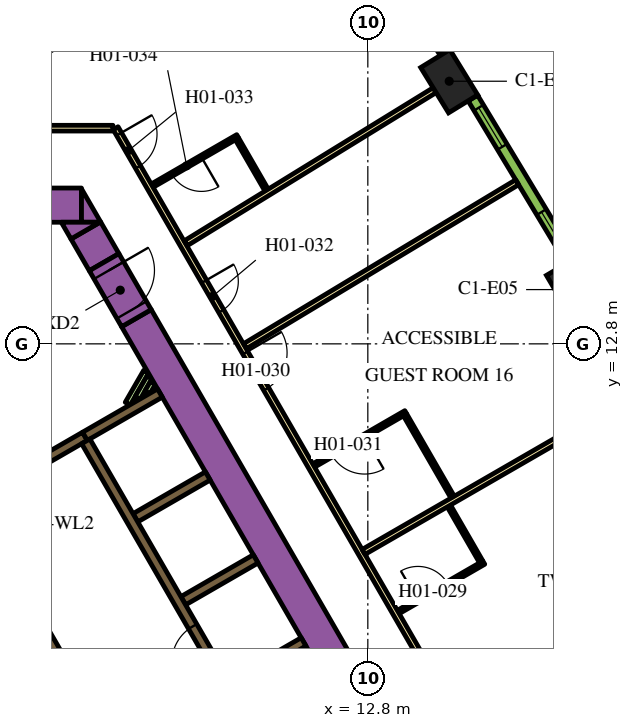
"""IFC4 building model, lengths in metres.
Left out: names, types, materials, properties, quantities, classifications, styles, units other than length and angle.
Written with IfcOpenShell. Run it as: python <this file> out.ifc"""

import sys

from ifc_helpers import new_model, si_unit, direction, frame, frame_2d, origin, origin_2d, place, context, subcontext, project, spatial, polyline, rectangle, outline, extrude, element, fill, save


model = new_model("IFC4")
c1 = context("Model", 3, precision=1e-05, world=origin(), true_north=direction((0.0, 1.0)))
c2 = subcontext(c1, "Body", "Model", "MODEL_VIEW")
j1 = project(units=[si_unit("LENGTHUNIT", "METRE"), si_unit("PLANEANGLEUNIT", "RADIAN")], contexts=[c1])
p1 = place(None, origin())
s1 = spatial("IfcSite", under=j1, at=p1, CompositionType="ELEMENT")
p2 = place(p1, origin())
s2 = spatial("IfcBuilding", under=s1, at=p2, CompositionType="ELEMENT")
p3 = place(p2, frame((0.0, 0.0, 35.4)))
s3 = spatial("IfcBuildingStorey", under=s2, at=p3, CompositionType="ELEMENT", Elevation=35.4)
for number, where, z_axis, x_axis in (
    (1, (18.243, 14.228, 0.0), (0.0, 0.0, 1.0), (-0.508, 0.861, 0.0)),
    (2, (14.942, 19.71, 0.0), (0.0, 0.0, 1.0), (-0.524, 0.852, 0.0)),
):
    element("IfcColumn", number, at=place(p3, frame(where, z_axis=z_axis, x_axis=x_axis)), inside=s3, PredefinedType="COLUMN", context=c2, shape_type="SweptSolid", body=[
        extrude(rectangle(XDim=1.4, YDim=0.9, at=origin_2d()), origin(), (0.0, 0.0, 1.0), 3.9),
    ])
p4 = place(p3, frame((6.711, 13.476, 0.0), z_axis=(0.0, 0.0, 1.0), x_axis=(0.500002723396, -0.866023831425, 0.0)))
e3 = element("IfcWall", 3, at=p4, inside=s3, PredefinedType="SOLIDWALL", context=c2, shape_type="SweptSolid", body=[
    extrude(rectangle(XDim=20.334, YDim=0.9, at=frame_2d((10.167, 0.0))), origin(), (0.0, 0.0, 1.0), 3.9),
])
p5 = place(p3, frame((-4.224, 16.45, 0.0), z_axis=(0.0, 0.0, 1.0), x_axis=(1.0, 0.0, 0.0)))
e4 = element("IfcWall", 4, at=p5, inside=s3, PredefinedType="SOLIDWALL", context=c2, shape_type="SweptSolid", body=[
    extrude(rectangle(XDim=9.488, YDim=0.9, at=frame_2d((4.744, 0.0))), origin(), (0.0, 0.0, 1.0), 3.9),
])
p6 = place(p3, origin())
e5 = element("IfcWall", 5, at=p6, inside=s3, PredefinedType="SOLIDWALL", context=c2, shape_type="SweptSolid", body=[
    extrude(outline(polyline([(5.265, 16.0), (5.265, 16.88), (5.773, 16.0), (5.265, 16.0)])), origin(), (0.0, 0.0, 1.0), 3.9),
])
p7 = place(p3, frame((5.861, 14.949, 0.0), z_axis=(0.0, 0.0, 1.0), x_axis=(-0.50011719232, 0.865957732194, 0.0)))
e6 = element("IfcWall", 6, at=p7, inside=s3, PredefinedType="SOLIDWALL", context=c2, shape_type="SweptSolid", body=[
    extrude(rectangle(XDim=0.964, YDim=0.9, at=frame_2d((0.482, 0.0))), origin(), (0.0, 0.0, 1.0), 3.9),
])
e7 = element("IfcWall", 7, at=p6, inside=s3, PredefinedType="SOLIDWALL", context=c2, shape_type="SweptSolid", body=[
    extrude(outline(polyline([(4.734, 16.0), (5.75, 16.0), (4.988, 15.56), (4.734, 16.0)])), origin(), (0.0, 0.0, 1.0), 3.9),
])
e8 = element("IfcWall", 8, at=p6, inside=s3, PredefinedType="SOLIDWALL", context=c2, shape_type="SweptSolid", body=[
    extrude(outline(polyline([(0.566, 6.725), (0.566, 6.875), (0.566, 6.875), (0.565, 6.875), (0.361, 6.875), (0.035, 7.439), (0.252, 7.564), (0.377, 7.348), (6.552, -3.348), (6.677, -3.564), (6.46, -3.689), (0.448, 6.725), (0.565, 6.725), (0.566, 6.725), (0.566, 6.725)])), origin(), (0.0, 0.0, 1.0), 3.9),
])
p8 = place(p3, frame((4.358, 9.791, 0.0), z_axis=(0.0, 0.0, 1.0), x_axis=(0.866079547155, 0.499906209203, 0.0)))
e9 = element("IfcWall", 9, at=p8, inside=s3, PredefinedType="SOLIDWALL", context=c2, shape_type="SweptSolid", body=[
    extrude(rectangle(XDim=1.15, YDim=0.25, at=frame_2d((0.575, 0.0))), origin(), (0.0, 0.0, 1.0), 3.9),
])
p9 = place(p3, frame((5.356, 10.367, 0.0), z_axis=(0.0, 0.0, 1.0), x_axis=(0.865978535641, 0.50008116922, 0.0)))
e10 = element("IfcWall", 10, at=p9, inside=s3, PredefinedType="SOLIDWALL", context=c2, shape_type="SweptSolid", body=[
    extrude(rectangle(XDim=2.278, YDim=0.25, at=frame_2d((1.139, 0.0))), origin(), (0.0, 0.0, 1.0), 3.9),
])
for number, where, z_axis, x_axis in (
    (11, (6.684, 8.224, 0.0), (0.0, 0.0, 1.0), (0.866, 0.5, 0.0)),
    (12, (7.944, 6.041, 0.0), (0.0, 0.0, 1.0), (0.866, 0.5, 0.0)),
    (13, (9.204, 3.859, 0.0), (0.0, 0.0, 1.0), (0.866, 0.5, 0.0)),
):
    element("IfcWall", number, at=place(p3, frame(where, z_axis=z_axis, x_axis=x_axis)), inside=s3, PredefinedType="SOLIDWALL", context=c2, shape_type="SweptSolid", body=[
        extrude(rectangle(XDim=2.2, YDim=0.25, at=frame_2d((1.1, 0.0))), origin(), (0.0, 0.0, 1.0), 3.9),
    ])
p10 = place(p3, frame((6.482, 11.225, 0.0), z_axis=(0.0, 0.0, 1.0), x_axis=(0.5001061818, 0.865964091014, 0.0)))
e14 = element("IfcWall", 14, at=p10, inside=s3, PredefinedType="PARTITIONING", context=c2, shape_type="SweptSolid", body=[
    extrude(rectangle(XDim=0.973, YDim=0.15, at=frame_2d((0.486, 0.0))), origin(), (0.0, 0.0, 1.0), 2.75),
])
p11 = place(p3, frame((6.742, 11.375, 0.0), z_axis=(0.0, 0.0, 1.0), x_axis=(0.499744951064, 0.86617260629, 0.0)))
e15 = element("IfcWall", 15, at=p11, inside=s3, PredefinedType="PARTITIONING", context=c2, shape_type="SweptSolid", body=[
    extrude(rectangle(XDim=0.626, YDim=0.15, at=frame_2d((0.313, 0.0))), origin(), (0.0, 0.0, 1.0), 2.75),
])
p12 = place(p3, frame((7.001, 11.525, 0.0), z_axis=(0.0, 0.0, 1.0), x_axis=(0.499797962495, 0.866142018774, 0.0)))
e16 = element("IfcWall", 16, at=p12, inside=s3, PredefinedType="PARTITIONING", context=c2, shape_type="SweptSolid", body=[
    extrude(rectangle(XDim=0.28, YDim=0.15, at=frame_2d((0.14, 0.0))), origin(), (0.0, 0.0, 1.0), 2.75),
])
p13 = place(p3, frame((11.553, -0.46, 0.0), z_axis=(0.0, 0.0, 1.0), x_axis=(-0.500006514828, 0.866021642414, 0.0)))
e17 = element("IfcWall", 17, at=p13, inside=s3, PredefinedType="SOLIDWALL", context=c2, shape_type="SweptSolid", body=[
    extrude(rectangle(XDim=12.35, YDim=0.25, at=frame_2d((6.175, 0.0))), origin(), (0.0, 0.0, 1.0), 3.9),
])
p14 = place(p13, frame((0.585, 0.0, 0.0)))
e18 = element("IfcOpeningElement", 18, at=p14, cuts=e17, PredefinedType="OPENING", context=c2, shape_type="SweptSolid", body=[
    extrude(rectangle(XDim=1.1, YDim=2.1, at=frame_2d((0.55, 1.05))), frame((0.0, 0.135, 0.0), z_axis=(0.0, -1.0, 0.0), x_axis=(1.0, 0.0, 0.0)), (0.0, 0.0, 1.0), 0.27),
])
p15 = place(p13, frame((3.105, 0.0, 0.0)))
e19 = element("IfcOpeningElement", 19, at=p15, cuts=e17, PredefinedType="OPENING", context=c2, shape_type="SweptSolid", body=[
    extrude(rectangle(XDim=1.1, YDim=2.1, at=frame_2d((0.55, 1.05))), frame((0.0, 0.135, 0.0), z_axis=(0.0, -1.0, 0.0), x_axis=(1.0, 0.0, 0.0)), (0.0, 0.0, 1.0), 0.27),
])
p16 = place(p13, frame((5.625, 0.0, 0.0)))
e20 = element("IfcOpeningElement", 20, at=p16, cuts=e17, PredefinedType="OPENING", context=c2, shape_type="SweptSolid", body=[
    extrude(rectangle(XDim=1.1, YDim=2.1, at=frame_2d((0.55, 1.05))), frame((0.0, 0.135, 0.0), z_axis=(0.0, -1.0, 0.0), x_axis=(1.0, 0.0, 0.0)), (0.0, 0.0, 1.0), 0.27),
])
p17 = place(p3, frame((8.565, -2.185, 0.0), z_axis=(0.0, 0.0, 1.0), x_axis=(-0.499997954832, 0.866026584559, 0.0)))
e21 = element("IfcWall", 21, at=p17, inside=s3, PredefinedType="SOLIDWALL", context=c2, shape_type="SweptSolid", body=[
    extrude(rectangle(XDim=12.35, YDim=0.25, at=frame_2d((6.175, 0.0))), origin(), (0.0, 0.0, 1.0), 3.9),
])
p18 = place(p17, frame((5.725, 0.0, 0.0)))
e22 = element("IfcOpeningElement", 22, at=p18, cuts=e21, PredefinedType="OPENING", context=c2, shape_type="SweptSolid", body=[
    extrude(rectangle(XDim=0.9, YDim=2.1, at=frame_2d((0.45, 1.05))), frame((0.0, 0.135, 0.0), z_axis=(0.0, -1.0, 0.0), x_axis=(1.0, 0.0, 0.0)), (0.0, 0.0, 1.0), 0.27),
])
p19 = place(p3, frame((5.861, 14.948, 0.0), z_axis=(0.0, 0.0, 1.0), x_axis=(0.500062241894, -0.865989465428, 0.0)))
e23 = element("IfcWall", 23, at=p19, inside=s3, PredefinedType="SOLIDWALL", context=c2, shape_type="SweptSolid", body=[
    extrude(rectangle(XDim=1.7, YDim=0.9, at=frame_2d((0.85, 0.0))), origin(), (0.0, 0.0, 1.0), 3.9),
])
p20 = place(p19, frame((0.25, 0.0, 0.0)))
e24 = element("IfcOpeningElement", 24, at=p20, cuts=e23, PredefinedType="OPENING", context=c2, shape_type="SweptSolid", body=[
    extrude(rectangle(XDim=1.2, YDim=2.1, at=frame_2d((0.6, 1.05))), frame((0.0, 0.46, 0.0), z_axis=(0.0, -1.0, 0.0), x_axis=(1.0, 0.0, 0.0)), (0.0, 0.0, 1.0), 0.92),
])
p21 = place(p3, frame((6.163, 18.475, 0.0), z_axis=(0.0, 0.0, 1.0), x_axis=(0.500001317485, -0.866024643133, 0.0)))
e25 = element("IfcWall", 25, at=p21, inside=s3, PredefinedType="PARTITIONING", context=c2, shape_type="SweptSolid", body=[
    extrude(rectangle(XDim=25.767, YDim=0.15, at=frame_2d((12.883, 0.0))), origin(), (0.0, 0.0, 1.0), 2.75),
])
p22 = place(p21, frame((24.586, 0.0, 0.0)))
e26 = element("IfcOpeningElement", 26, at=p22, cuts=e25, PredefinedType="OPENING", context=c2, shape_type="SweptSolid", body=[
    extrude(rectangle(XDim=1.0, YDim=2.1, at=frame_2d((0.5, 1.05))), frame((0.0, 0.085, 0.0), z_axis=(0.0, -1.0, 0.0), x_axis=(1.0, 0.0, 0.0)), (0.0, 0.0, 1.0), 0.17),
])
p23 = place(p21, frame((19.319, 0.0, 0.0)))
e27 = element("IfcOpeningElement", 27, at=p23, cuts=e25, PredefinedType="OPENING", context=c2, shape_type="SweptSolid", body=[
    extrude(rectangle(XDim=1.0, YDim=2.1, at=frame_2d((0.5, 1.05))), frame((0.0, 0.085, 0.0), z_axis=(0.0, -1.0, 0.0), x_axis=(1.0, 0.0, 0.0)), (0.0, 0.0, 1.0), 0.17),
])
p24 = place(p21, frame((18.012, 0.0, 0.0)))
e28 = element("IfcOpeningElement", 28, at=p24, cuts=e25, PredefinedType="OPENING", context=c2, shape_type="SweptSolid", body=[
    extrude(rectangle(XDim=1.0, YDim=2.1, at=frame_2d((0.5, 1.05))), frame((0.0, 0.085, 0.0), z_axis=(0.0, -1.0, 0.0), x_axis=(1.0, 0.0, 0.0)), (0.0, 0.0, 1.0), 0.17),
])
p25 = place(p21, frame((6.824, 0.0, 0.0)))
e29 = element("IfcOpeningElement", 29, at=p25, cuts=e25, PredefinedType="OPENING", context=c2, shape_type="SweptSolid", body=[
    extrude(rectangle(XDim=1.1, YDim=2.1, at=frame_2d((0.55, 1.05))), frame((0.0, 0.085, 0.0), z_axis=(0.0, -1.0, 0.0), x_axis=(1.0, 0.0, 0.0)), (0.0, 0.0, 1.0), 0.17),
])
p26 = place(p21, frame((4.658, 0.0, 0.0)))
e30 = element("IfcOpeningElement", 30, at=p26, cuts=e25, PredefinedType="OPENING", context=c2, shape_type="SweptSolid", body=[
    extrude(rectangle(XDim=0.9, YDim=2.1, at=frame_2d((0.45, 1.05))), frame((0.0, 0.085, 0.0), z_axis=(0.0, -1.0, 0.0), x_axis=(1.0, 0.0, 0.0)), (0.0, 0.0, 1.0), 0.17),
])
p27 = place(p21, frame((0.18, 0.0, 0.0)))
e31 = element("IfcOpeningElement", 31, at=p27, cuts=e25, PredefinedType="OPENING", context=c2, shape_type="SweptSolid", body=[
    extrude(rectangle(XDim=1.0, YDim=2.1, at=frame_2d((0.5, 1.05))), frame((0.0, 0.085, 0.0), z_axis=(0.0, -1.0, 0.0), x_axis=(1.0, 0.0, 0.0)), (0.0, 0.0, 1.0), 0.17),
])
p28 = place(p3, frame((0.825, 18.475, 0.0), z_axis=(0.0, 0.0, 1.0), x_axis=(1.0, 0.0, 0.0)))
e32 = element("IfcWall", 32, at=p28, inside=s3, PredefinedType="PARTITIONING", context=c2, shape_type="SweptSolid", body=[
    extrude(rectangle(XDim=5.268, YDim=0.15, at=frame_2d((2.634, 0.0))), origin(), (0.0, 0.0, 1.0), 2.75),
])
p29 = place(p3, frame((11.16, 24.888, 0.0), z_axis=(0.0, 0.0, 1.0), x_axis=(-0.84199813156, -0.539480441211, 0.0)))
e33 = element("IfcWall", 33, at=p29, inside=s3, PredefinedType="PARTITIONING", context=c2, shape_type="SweptSolid", body=[
    extrude(rectangle(XDim=11.638, YDim=0.15, at=frame_2d((5.819, 0.0))), origin(), (0.0, 0.0, 1.0), 2.75),
])
p30 = place(p3, frame((14.558, 19.475, 0.0), z_axis=(0.0, 0.0, 1.0), x_axis=(-0.851829455142, -0.523819223925, 0.0)))
e34 = element("IfcWall", 34, at=p30, inside=s3, PredefinedType="PARTITIONING", context=c2, shape_type="SweptSolid", body=[
    extrude(rectangle(XDim=7.688, YDim=0.15, at=frame_2d((3.844, 0.0))), origin(), (0.0, 0.0, 1.0), 2.75),
])
p31 = place(p3, frame((16.729, 17.052, 0.0), z_axis=(0.0, 0.0, 1.0), x_axis=(-0.856630606266, -0.515930232113, 0.0)))
e35 = element("IfcWall", 35, at=p31, inside=s3, PredefinedType="PARTITIONING", context=c2, shape_type="SweptSolid", body=[
    extrude(rectangle(XDim=8.355, YDim=0.15, at=frame_2d((4.178, 0.0))), origin(), (0.0, 0.0, 1.0), 2.75),
])
p32 = place(p3, frame((19.982, 11.537, 0.0), z_axis=(0.0, 0.0, 1.0), x_axis=(-0.866020994654, -0.500007636761, 0.0)))
e36 = element("IfcWall", 36, at=p32, inside=s3, PredefinedType="PARTITIONING", context=c2, shape_type="SweptSolid", body=[
    extrude(rectangle(XDim=8.423, YDim=0.15, at=frame_2d((4.211, 0.0))), origin(), (0.0, 0.0, 1.0), 2.75),
])
p33 = place(p3, frame((23.132, 5.962, 0.0), z_axis=(0.0, 0.0, 1.0), x_axis=(-0.875121716713, -0.483902863121, 0.0)))
e37 = element("IfcWall", 37, at=p33, inside=s3, PredefinedType="PARTITIONING", context=c2, shape_type="SweptSolid", body=[
    extrude(rectangle(XDim=8.355, YDim=0.15, at=frame_2d((4.178, 0.0))), origin(), (0.0, 0.0, 1.0), 2.75),
])
p34 = place(p3, frame((13.6, 5.744, 0.0), z_axis=(0.0, 0.0, 1.0), x_axis=(0.866021400173, 0.500006934395, 0.0)))
e38 = element("IfcWall", 38, at=p34, inside=s3, PredefinedType="PARTITIONING", context=c2, shape_type="SweptSolid", body=[
    extrude(rectangle(XDim=2.6, YDim=0.1, at=frame_2d((1.3, 0.0))), origin(), (0.0, 0.0, 1.0), 2.75),
])
p35 = place(p34, frame((0.6, 0.0, 0.0)))
e39 = element("IfcOpeningElement", 39, at=p35, cuts=e38, PredefinedType="OPENING", context=c2, shape_type="SweptSolid", body=[
    extrude(rectangle(XDim=0.9, YDim=2.1, at=frame_2d((0.45, 1.05))), frame((0.0, 0.06, 0.0), z_axis=(0.0, -1.0, 0.0), x_axis=(1.0, 0.0, 0.0)), (0.0, 0.0, 1.0), 0.12),
])
p36 = place(p3, frame((15.779, 7.071, 0.0), z_axis=(0.0, 0.0, 1.0), x_axis=(-0.499976720371, 0.866038843867, 0.0)))
e40 = element("IfcWall", 40, at=p36, inside=s3, PredefinedType="PARTITIONING", context=c2, shape_type="SweptSolid", body=[
    extrude(rectangle(XDim=1.69, YDim=0.1, at=frame_2d((0.845, 0.0))), origin(), (0.0, 0.0, 1.0), 2.75),
])
p37 = place(p3, frame((13.799, 10.999, 0.0), z_axis=(0.0, 0.0, 1.0), x_axis=(-0.866034573852, -0.49998411664, 0.0)))
e41 = element("IfcWall", 41, at=p37, inside=s3, PredefinedType="PARTITIONING", context=c2, shape_type="SweptSolid", body=[
    extrude(rectangle(XDim=2.8, YDim=0.1, at=frame_2d((1.4, 0.0))), origin(), (0.0, 0.0, 1.0), 2.75),
])
p38 = place(p37, frame((1.25, 0.0, 0.0)))
e42 = element("IfcOpeningElement", 42, at=p38, cuts=e41, PredefinedType="OPENING", context=c2, shape_type="SweptSolid", body=[
    extrude(rectangle(XDim=1.0, YDim=2.1, at=frame_2d((0.5, 1.05))), frame((0.0, 0.06, 0.0), z_axis=(0.0, -1.0, 0.0), x_axis=(1.0, 0.0, 0.0)), (0.0, 0.0, 1.0), 0.12),
])
p39 = place(p3, frame((13.781, 10.931, 0.0), z_axis=(0.0, 0.0, 1.0), x_axis=(0.500004234368, -0.866022959057, 0.0)))
e43 = element("IfcWall", 43, at=p39, inside=s3, PredefinedType="PARTITIONING", context=c2, shape_type="SweptSolid", body=[
    extrude(rectangle(XDim=2.5, YDim=0.1, at=frame_2d((1.25, 0.0))), origin(), (0.0, 0.0, 1.0), 2.75),
])
p40 = place(p3, frame((9.375, 18.261, 0.0), z_axis=(0.0, 0.0, 1.0), x_axis=(-0.866021400173, -0.500006934395, 0.0)))
e44 = element("IfcWall", 44, at=p40, inside=s3, PredefinedType="PARTITIONING", context=c2, shape_type="SweptSolid", body=[
    extrude(rectangle(XDim=2.6, YDim=0.1, at=frame_2d((1.3, 0.0))), origin(), (0.0, 0.0, 1.0), 2.75),
])
p41 = place(p40, frame((1.1, 0.0, 0.0)))
e45 = element("IfcOpeningElement", 45, at=p41, cuts=e44, PredefinedType="OPENING", context=c2, shape_type="SweptSolid", body=[
    extrude(rectangle(XDim=0.9, YDim=2.1, at=frame_2d((0.45, 1.05))), frame((0.0, 0.06, 0.0), z_axis=(0.0, -1.0, 0.0), x_axis=(1.0, 0.0, 0.0)), (0.0, 0.0, 1.0), 0.12),
])
p42 = place(p3, frame((9.357, 18.193, 0.0), z_axis=(0.0, 0.0, 1.0), x_axis=(0.499899694197, -0.866083307622, 0.0)))
e46 = element("IfcWall", 46, at=p42, inside=s3, PredefinedType="PARTITIONING", context=c2, shape_type="SweptSolid", body=[
    extrude(rectangle(XDim=1.55, YDim=0.1, at=frame_2d((0.775, 0.0))), origin(), (0.0, 0.0, 1.0), 2.75),
])
p43 = place(p3, frame((18.143, 14.986, 0.0), z_axis=(0.0, 0.0, 1.0), x_axis=(-0.515938796285, 0.856625448191, 0.0)))
e47 = element("IfcWall", 47, at=p43, inside=s3, PredefinedType="SOLIDWALL", context=c2, shape_type="SweptSolid", body=[
    extrude(rectangle(XDim=4.998, YDim=0.29, at=frame_2d((2.499, 0.0))), origin(), (0.0, 0.0, 1.0), 3.65),
])
p44 = place(p43, frame((0.297, 0.0, 0.9)))
e48 = element("IfcOpeningElement", 48, at=p44, cuts=e47, PredefinedType="OPENING", context=c2, shape_type="SweptSolid", body=[
    extrude(rectangle(XDim=1.2, YDim=2.15, at=frame_2d((0.6, 1.075))), frame((0.0, 0.155, 0.0), z_axis=(0.0, -1.0, 0.0), x_axis=(1.0, 0.0, 0.0)), (0.0, 0.0, 1.0), 0.31),
])
p45 = place(p43, frame((3.501, 0.0, 0.9)))
e49 = element("IfcOpeningElement", 49, at=p45, cuts=e47, PredefinedType="OPENING", context=c2, shape_type="SweptSolid", body=[
    extrude(rectangle(XDim=1.2, YDim=2.15, at=frame_2d((0.6, 1.075))), frame((0.0, 0.155, 0.0), z_axis=(0.0, -1.0, 0.0), x_axis=(1.0, 0.0, 0.0)), (0.0, 0.0, 1.0), 0.31),
])
p46 = place(p3, frame((14.827, 20.466, 0.0), z_axis=(0.0, 0.0, 1.0), x_axis=(-0.531688286542, 0.846940119462, 0.0)))
e50 = element("IfcWall", 50, at=p46, inside=s3, PredefinedType="SOLIDWALL", context=c2, shape_type="SweptSolid", body=[
    extrude(rectangle(XDim=4.998, YDim=0.29, at=frame_2d((2.499, 0.0))), origin(), (0.0, 0.0, 1.0), 3.65),
])
p47 = place(p46, frame((0.297, 0.0, 0.9)))
e51 = element("IfcOpeningElement", 51, at=p47, cuts=e50, PredefinedType="OPENING", context=c2, shape_type="SweptSolid", body=[
    extrude(rectangle(XDim=1.2, YDim=2.15, at=frame_2d((0.6, 1.075))), frame((0.0, 0.155, 0.0), z_axis=(0.0, -1.0, 0.0), x_axis=(1.0, 0.0, 0.0)), (0.0, 0.0, 1.0), 0.31),
])
p48 = place(p46, frame((3.501, 0.0, 0.9)))
e52 = element("IfcOpeningElement", 52, at=p48, cuts=e50, PredefinedType="OPENING", context=c2, shape_type="SweptSolid", body=[
    extrude(rectangle(XDim=1.2, YDim=2.15, at=frame_2d((0.6, 1.075))), frame((0.0, 0.155, 0.0), z_axis=(0.0, -1.0, 0.0), x_axis=(1.0, 0.0, 0.0)), (0.0, 0.0, 1.0), 0.31),
])
p49 = place(p16, origin())
e53 = element("IfcDoor", 53, at=p49, inside=s3, OperationType="DOUBLE_DOOR_SLIDING", PredefinedType="DOOR", context=c2, shape_type="SweptSolid", body=[
    extrude(rectangle(XDim=1.1, YDim=2.1, at=frame_2d((0.55, 1.05))), frame((0.0, 0.025, 0.0), z_axis=(0.0, -1.0, 0.0), x_axis=(1.0, 0.0, 0.0)), (0.0, 0.0, 1.0), 0.05),
])
fill(e20, e53)
p50 = place(p20, origin())
e54 = element("IfcDoor", 54, at=p50, inside=s3, OperationType="SINGLE_SWING_LEFT", PredefinedType="DOOR", context=c2, shape_type="SweptSolid", body=[
    extrude(rectangle(XDim=1.2, YDim=2.1, at=frame_2d((0.6, 1.05))), frame((0.0, 0.025, 0.0), z_axis=(0.0, -1.0, 0.0), x_axis=(1.0, 0.0, 0.0)), (0.0, 0.0, 1.0), 0.05),
])
fill(e24, e54)
p51 = place(p35, origin())
e55 = element("IfcDoor", 55, at=p51, inside=s3, OperationType="SINGLE_SWING_RIGHT", PredefinedType="DOOR", context=c2, shape_type="SweptSolid", body=[
    extrude(rectangle(XDim=0.9, YDim=2.1, at=frame_2d((0.45, 1.05))), frame((0.0, 0.025, 0.0), z_axis=(0.0, -1.0, 0.0), x_axis=(1.0, 0.0, 0.0)), (0.0, 0.0, 1.0), 0.05),
])
fill(e39, e55)
p52 = place(p25, origin())
e56 = element("IfcDoor", 56, at=p52, inside=s3, OperationType="SINGLE_SWING_LEFT", PredefinedType="DOOR", context=c2, shape_type="SweptSolid", body=[
    extrude(rectangle(XDim=1.1, YDim=2.1, at=frame_2d((0.55, 1.05))), frame((0.0, 0.025, 0.0), z_axis=(0.0, -1.0, 0.0), x_axis=(1.0, 0.0, 0.0)), (0.0, 0.0, 1.0), 0.05),
])
fill(e29, e56)
p53 = place(p38, origin())
e57 = element("IfcDoor", 57, at=p53, inside=s3, OperationType="SINGLE_SWING_LEFT", PredefinedType="DOOR", context=c2, shape_type="SweptSolid", body=[
    extrude(rectangle(XDim=1.0, YDim=2.1, at=frame_2d((0.5, 1.05))), frame((0.0, 0.025, 0.0), z_axis=(0.0, -1.0, 0.0), x_axis=(1.0, 0.0, 0.0)), (0.0, 0.0, 1.0), 0.05),
])
fill(e42, e57)
p54 = place(p26, origin())
e58 = element("IfcDoor", 58, at=p54, inside=s3, OperationType="SINGLE_SWING_LEFT", PredefinedType="DOOR", context=c2, shape_type="SweptSolid", body=[
    extrude(rectangle(XDim=0.9, YDim=2.1, at=frame_2d((0.45, 1.05))), frame((0.0, 0.025, 0.0), z_axis=(0.0, -1.0, 0.0), x_axis=(1.0, 0.0, 0.0)), (0.0, 0.0, 1.0), 0.05),
])
fill(e30, e58)
p55 = place(p27, origin())
e59 = element("IfcDoor", 59, at=p55, inside=s3, OperationType="SINGLE_SWING_LEFT", PredefinedType="DOOR", context=c2, shape_type="SweptSolid", body=[
    extrude(rectangle(XDim=1.0, YDim=2.1, at=frame_2d((0.5, 1.05))), frame((0.0, 0.025, 0.0), z_axis=(0.0, -1.0, 0.0), x_axis=(1.0, 0.0, 0.0)), (0.0, 0.0, 1.0), 0.05),
])
fill(e31, e59)
p56 = place(p41, origin())
e60 = element("IfcDoor", 60, at=p56, inside=s3, OperationType="SINGLE_SWING_RIGHT", PredefinedType="DOOR", context=c2, shape_type="SweptSolid", body=[
    extrude(rectangle(XDim=0.9, YDim=2.1, at=frame_2d((0.45, 1.05))), frame((0.0, 0.025, 0.0), z_axis=(0.0, -1.0, 0.0), x_axis=(1.0, 0.0, 0.0)), (0.0, 0.0, 1.0), 0.05),
])
fill(e45, e60)
p57 = place(p44, origin())
e61 = element("IfcWindow", 61, at=p57, inside=s3, PartitioningType="DOUBLE_PANEL_VERTICAL", PredefinedType="WINDOW", context=c2, shape_type="SweptSolid", body=[
    extrude(rectangle(XDim=1.2, YDim=2.15, at=frame_2d((0.6, 1.075))), frame((0.0, 0.015, 0.0), z_axis=(0.0, -1.0, 0.0), x_axis=(1.0, 0.0, 0.0)), (0.0, 0.0, 1.0), 0.06),
])
fill(e48, e61)
p58 = place(p45, origin())
e62 = element("IfcWindow", 62, at=p58, inside=s3, PartitioningType="DOUBLE_PANEL_VERTICAL", PredefinedType="WINDOW", context=c2, shape_type="SweptSolid", body=[
    extrude(rectangle(XDim=1.2, YDim=2.15, at=frame_2d((0.6, 1.075))), frame((0.0, 0.015, 0.0), z_axis=(0.0, -1.0, 0.0), x_axis=(1.0, 0.0, 0.0)), (0.0, 0.0, 1.0), 0.06),
])
fill(e49, e62)
save(model, sys.argv[1])
